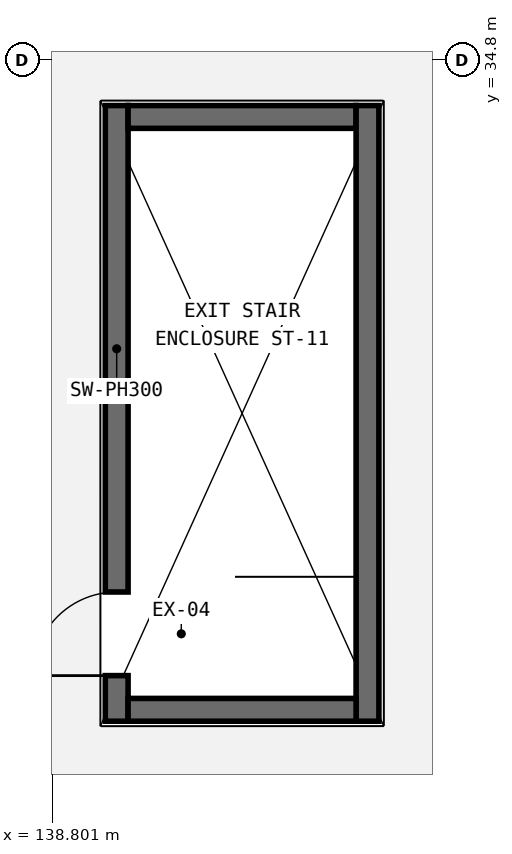
"""IFC4 building model, lengths in metres.
Left out: names, types, materials, properties, quantities, classifications, styles, units other than length and angle.
Written with IfcOpenShell. Run it as: python <this file> out.ifc"""

import sys

from ifc_helpers import new_model, si_unit, direction, frame, frame_2d, origin, place, context, subcontext, project, spatial, rectangle, extrude, element, fill, save


model = new_model("IFC4")
c1 = context("Model", 3, precision=1e-05, world=origin(), true_north=direction((0.0, 1.0)))
c2 = subcontext(c1, "Body", "Model", "MODEL_VIEW")
j1 = project(units=[si_unit("LENGTHUNIT", "METRE"), si_unit("PLANEANGLEUNIT", "RADIAN")], contexts=[c1])
p1 = place(None, origin())
s1 = spatial("IfcSite", under=j1, at=p1, CompositionType="ELEMENT")
p2 = place(p1, origin())
s2 = spatial("IfcBuilding", under=s1, at=p2, CompositionType="ELEMENT")
p3 = place(p2, origin())
s3 = spatial("IfcBuildingStorey", under=s2, at=p3, CompositionType="ELEMENT", Elevation=0.0)
p4 = place(p3, frame((139.65, 26.1, 0.0), z_axis=(0.0, 0.0, 1.0), x_axis=(0.0, 1.0, 0.0)))
e1 = element("IfcWall", 1, at=p4, inside=s3, PredefinedType="SHEAR", context=c2, shape_type="SweptSolid", body=[
    extrude(rectangle(XDim=8.1, YDim=0.3, at=frame_2d((4.05, 0.0))), origin(), (0.0, 0.0, 1.0), 3.2),
])
p5 = place(p4, frame((0.6, 0.0, 0.0)))
e2 = element("IfcOpeningElement", 2, at=p5, cuts=e1, PredefinedType="OPENING", context=c2, shape_type="SweptSolid", body=[
    extrude(rectangle(XDim=1.1, YDim=2.15, at=frame_2d((0.55, 1.075))), frame((0.0, 0.16, 0.0), z_axis=(0.0, -1.0, 0.0), x_axis=(1.0, 0.0, 0.0)), (0.0, 0.0, 1.0), 0.32),
])
p6 = place(p3, frame((139.8, 34.05, 0.0), z_axis=(0.0, 0.0, 1.0), x_axis=(1.0, 0.0, 0.0)))
e3 = element("IfcWall", 3, at=p6, inside=s3, PredefinedType="SHEAR", context=c2, shape_type="SweptSolid", body=[
    extrude(rectangle(XDim=3.0, YDim=0.3, at=frame_2d((1.5, 0.0))), origin(), (0.0, 0.0, 1.0), 3.2),
])
p7 = place(p3, frame((142.95, 34.2, 0.0), z_axis=(0.0, 0.0, 1.0), x_axis=(0.0, -1.0, 0.0)))
e4 = element("IfcWall", 4, at=p7, inside=s3, PredefinedType="SHEAR", context=c2, shape_type="SweptSolid", body=[
    extrude(rectangle(XDim=8.1, YDim=0.3, at=frame_2d((4.05, 0.0))), origin(), (0.0, 0.0, 1.0), 3.2),
])
p8 = place(p3, frame((142.8, 26.25, 0.0), z_axis=(0.0, 0.0, 1.0), x_axis=(-1.0, 0.0, 0.0)))
e5 = element("IfcWall", 5, at=p8, inside=s3, PredefinedType="SHEAR", context=c2, shape_type="SweptSolid", body=[
    extrude(rectangle(XDim=3.0, YDim=0.3, at=frame_2d((1.5, 0.0))), origin(), (0.0, 0.0, 1.0), 3.2),
])
p9 = place(p5, origin())
e6 = element("IfcDoor", 6, at=p9, inside=s3, OperationType="SINGLE_SWING_LEFT", PredefinedType="DOOR", context=c2, shape_type="SweptSolid", body=[
    extrude(rectangle(XDim=1.1, YDim=2.15, at=frame_2d((0.55, 1.075))), frame((0.0, 0.025, 0.0), z_axis=(0.0, -1.0, 0.0), x_axis=(1.0, 0.0, 0.0)), (0.0, 0.0, 1.0), 0.05),
])
fill(e2, e6)
save(model, sys.argv[1])
